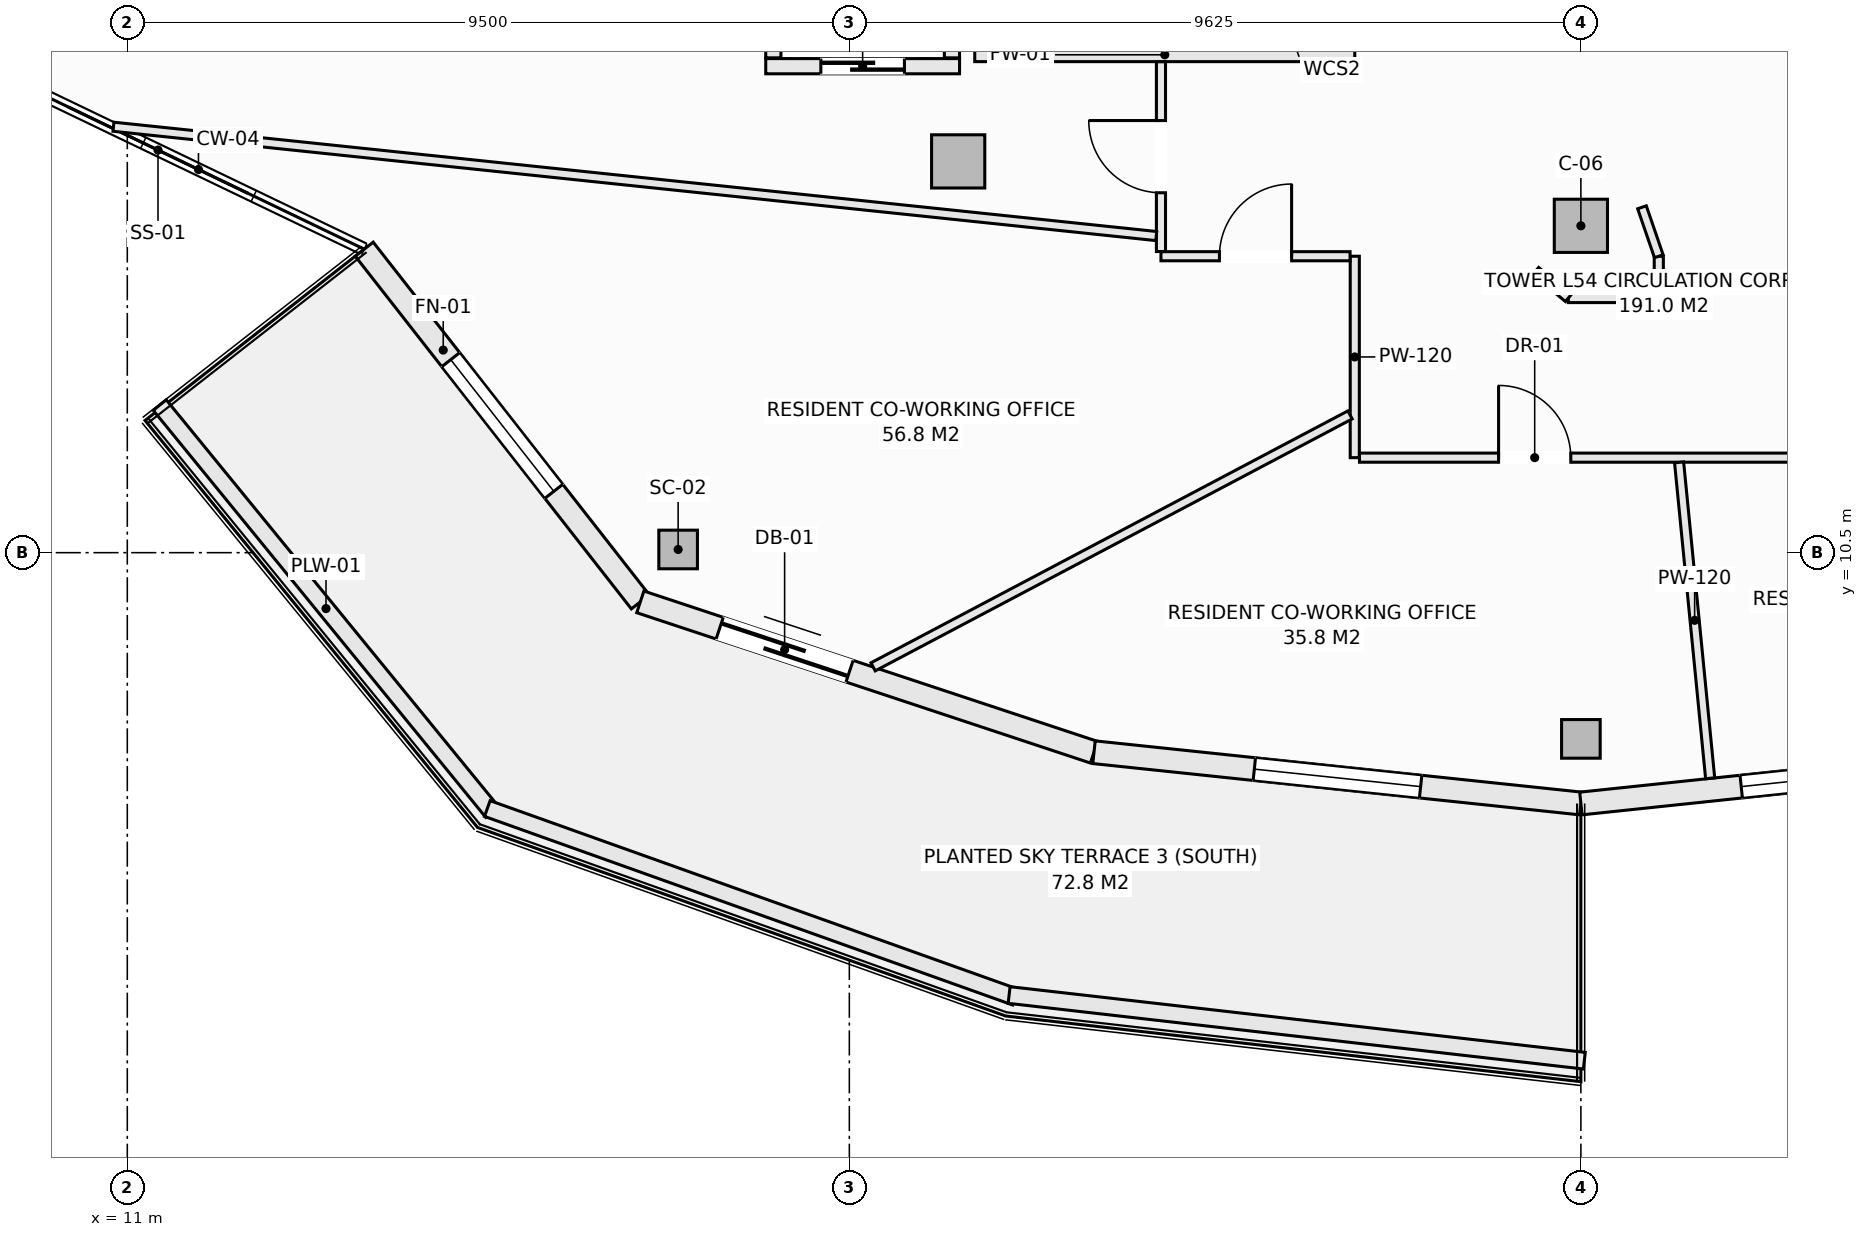
"""IFC4 building model, lengths in metres.
Left out: names, types, materials, properties, quantities, classifications, styles, units other than length and angle.
Written with IfcOpenShell. Run it as: python <this file> out.ifc"""

import sys

from ifc_helpers import new_model, si_unit, direction, frame, frame_2d, origin, origin_2d, place, context, subcontext, project, spatial, rectangle, hollow_rectangle, extrude, element, fill, save


model = new_model("IFC4")
c1 = context("Model", 3, precision=1e-05, world=origin(), true_north=direction((0.0, 1.0)))
c2 = subcontext(c1, "Body", "Model", "MODEL_VIEW")
j1 = project(units=[si_unit("LENGTHUNIT", "METRE"), si_unit("PLANEANGLEUNIT", "RADIAN")], contexts=[c1])
p1 = place(None, origin())
s1 = spatial("IfcSite", under=j1, at=p1, CompositionType="ELEMENT")
p2 = place(p1, origin())
s2 = spatial("IfcBuilding", under=s1, at=p2, CompositionType="ELEMENT")
p3 = place(p2, frame((0.0, 0.0, 206.3)))
s3 = spatial("IfcBuildingStorey", under=s2, at=p3, CompositionType="ELEMENT", Elevation=206.3)
for number, where, z_axis, x_axis in (
    (1, (18.247, 10.542, -0.27), (0.0, 0.0, 1.0), (1.0, 0.0, 0.0)),
    (2, (30.125, 8.05, -0.27), (0.0, 0.0, 1.0), (1.0, 0.0, 0.0)),
):
    element("IfcColumn", number, at=place(p3, frame(where, z_axis=z_axis, x_axis=x_axis)), inside=s3, PredefinedType="COLUMN", context=c2, shape_type="SweptSolid", body=[
        extrude(hollow_rectangle(XDim=0.508, YDim=0.508, WallThickness=0.019, at=origin_2d()), origin(), (0.0, 0.0, 1.0), 3.3),
    ])
for number, where, z_axis, x_axis in (
    (3, (21.932, 15.648, -0.27), (0.0, 0.0, 1.0), (1.0, 0.0, 0.0)),
    (4, (30.125, 14.8, -0.27), (0.0, 0.0, 1.0), (1.0, 0.0, 0.0)),
):
    element("IfcColumn", number, at=place(p3, frame(where, z_axis=z_axis, x_axis=x_axis)), inside=s3, PredefinedType="COLUMN", context=c2, shape_type="SweptSolid", body=[
        extrude(rectangle(XDim=0.7, YDim=0.7, at=origin_2d()), origin(), (0.0, 0.0, 1.0), 3.3),
    ])
p4 = place(p3, frame((14.117, 14.493, 0.0), z_axis=(0.0, 0.0, 1.0), x_axis=(0.616450126935, -0.787393955401, 0.0)))
e5 = element("IfcWall", 5, at=p4, inside=s3, PredefinedType="SOLIDWALL", context=c2, shape_type="SweptSolid", body=[
    extrude(rectangle(XDim=5.893, YDim=0.3, at=frame_2d((2.946, 0.0))), origin(), (0.0, 0.0, 1.0), 2.605),
])
p5 = place(p4, frame((1.846, 0.0, 0.72)))
e6 = element("IfcOpeningElement", 6, at=p5, cuts=e5, PredefinedType="OPENING", context=c2, shape_type="SweptSolid", body=[
    extrude(rectangle(XDim=2.2, YDim=1.65, at=frame_2d((1.1, 0.825))), frame((0.0, 0.16, 0.0), z_axis=(0.0, -1.0, 0.0), x_axis=(1.0, 0.0, 0.0)), (0.0, 0.0, 1.0), 0.32),
])
p6 = place(p3, frame((17.75, 9.853, 0.0), z_axis=(0.0, 0.0, 1.0), x_axis=(0.949240877604, -0.314550085495, 0.0)))
e7 = element("IfcWall", 7, at=p6, inside=s3, PredefinedType="SOLIDWALL", context=c2, shape_type="SweptSolid", body=[
    extrude(rectangle(XDim=6.288, YDim=0.3, at=frame_2d((3.144, 0.0))), origin(), (0.0, 0.0, 1.0), 2.605),
])
p7 = place(p6, frame((1.1, 0.0, 0.0)))
e8 = element("IfcOpeningElement", 8, at=p7, cuts=e7, PredefinedType="OPENING", context=c2, shape_type="SweptSolid", body=[
    extrude(rectangle(XDim=1.8, YDim=2.25, at=frame_2d((0.9, 1.125))), frame((0.0, 0.16, 0.0), z_axis=(0.0, -1.0, 0.0), x_axis=(1.0, 0.0, 0.0)), (0.0, 0.0, 1.0), 0.32),
])
p8 = place(p3, frame((23.719, 7.875, 0.0), z_axis=(0.0, 0.0, 1.0), x_axis=(0.994497142298, -0.104763705363, 0.0)))
e9 = element("IfcWall", 9, at=p8, inside=s3, PredefinedType="SOLIDWALL", context=c2, shape_type="SweptSolid", body=[
    extrude(rectangle(XDim=6.441, YDim=0.3, at=frame_2d((3.221, 0.0))), origin(), (0.0, 0.0, 1.0), 2.605),
])
p9 = place(p8, frame((2.121, 0.0, 0.72)))
e10 = element("IfcOpeningElement", 10, at=p9, cuts=e9, PredefinedType="OPENING", context=c2, shape_type="SweptSolid", body=[
    extrude(rectangle(XDim=2.2, YDim=1.65, at=frame_2d((1.1, 0.825))), frame((0.0, 0.16, 0.0), z_axis=(0.0, -1.0, 0.0), x_axis=(1.0, 0.0, 0.0)), (0.0, 0.0, 1.0), 0.32),
])
p10 = place(p3, frame((30.125, 7.2, 0.0), z_axis=(0.0, 0.0, 1.0), x_axis=(0.994497142298, 0.104763705363, 0.0)))
e11 = element("IfcWall", 11, at=p10, inside=s3, PredefinedType="SOLIDWALL", context=c2, shape_type="SweptSolid", body=[
    extrude(rectangle(XDim=6.441, YDim=0.3, at=frame_2d((3.221, 0.0))), origin(), (0.0, 0.0, 1.0), 2.605),
])
p11 = place(p10, frame((2.121, 0.0, 0.72)))
e12 = element("IfcOpeningElement", 12, at=p11, cuts=e11, PredefinedType="OPENING", context=c2, shape_type="SweptSolid", body=[
    extrude(rectangle(XDim=2.2, YDim=1.65, at=frame_2d((1.1, 0.825))), frame((0.0, 0.16, 0.0), z_axis=(0.0, -1.0, 0.0), x_axis=(1.0, 0.0, 0.0)), (0.0, 0.0, 1.0), 0.32),
])
p12 = place(p3, frame((11.427, 12.441, 0.0), z_axis=(0.0, 0.0, 1.0), x_axis=(0.632697312147, -0.774399193699, 0.0)))
e13 = element("IfcWall", 13, at=p12, inside=s3, PredefinedType="PARAPET", context=c2, shape_type="SweptSolid", body=[
    extrude(rectangle(XDim=6.914, YDim=0.22, at=frame_2d((3.457, 0.0))), origin(), (0.0, 0.0, 1.0), 0.52),
])
p13 = place(p3, frame((15.737, 7.134, 0.0), z_axis=(0.0, 0.0, 1.0), x_axis=(0.941780086523, -0.336229488042, 0.0)))
e14 = element("IfcWall", 14, at=p13, inside=s3, PredefinedType="PARAPET", context=c2, shape_type="SweptSolid", body=[
    extrude(rectangle(XDim=7.378, YDim=0.22, at=frame_2d((3.689, 0.0))), origin(), (0.0, 0.0, 1.0), 0.52),
])
p14 = place(p3, frame((22.602, 4.68, 0.0), z_axis=(0.0, 0.0, 1.0), x_axis=(0.993546198781, -0.113428175021, 0.0)))
e15 = element("IfcWall", 15, at=p14, inside=s3, PredefinedType="PARAPET", context=c2, shape_type="SweptSolid", body=[
    extrude(rectangle(XDim=7.617, YDim=0.22, at=frame_2d((3.809, 0.0))), origin(), (0.0, 0.0, 1.0), 0.52),
])
p15 = place(p3, frame((19.4, 16.9, 0.0), z_axis=(0.0, 0.0, 1.0), x_axis=(1.0, 0.0, 0.0)))
e16 = element("IfcWall", 16, at=p15, inside=s3, PredefinedType="SOLIDWALL", context=c2, shape_type="SweptSolid", body=[
    extrude(rectangle(XDim=2.55, YDim=0.2, at=frame_2d((1.275, 0.0))), origin(), (0.0, 0.0, 1.0), 3.03),
])
p16 = place(p15, frame((0.725, 0.0, 0.0)))
e17 = element("IfcOpeningElement", 17, at=p16, cuts=e16, PredefinedType="OPENING", context=c2, shape_type="SweptSolid", body=[
    extrude(rectangle(XDim=1.1, YDim=2.2, at=frame_2d((0.55, 1.1))), frame((0.0, 0.11, 0.0), z_axis=(0.0, -1.0, 0.0), x_axis=(1.0, 0.0, 0.0)), (0.0, 0.0, 1.0), 0.22),
])
for number, where, z_axis, x_axis in (
    (18, (19.5, 17.01, 0.0), (0.0, 0.0, 1.0), (0.0, 1.0, 0.0)),
    (19, (21.85, 17.01, 0.0), (0.0, 0.0, 1.0), (0.0, 1.0, 0.0)),
):
    element("IfcWall", number, at=place(p3, frame(where, z_axis=z_axis, x_axis=x_axis)), inside=s3, PredefinedType="SOLIDWALL", context=c2, shape_type="SweptSolid", body=[
        extrude(rectangle(XDim=2.53, YDim=0.2, at=frame_2d((1.265, 0.0))), origin(), (0.0, 0.0, 1.0), 3.03),
    ])
p17 = place(p3, frame((22.15, 17.05, 0.0), z_axis=(0.0, 0.0, 1.0), x_axis=(1.0, 0.0, 0.0)))
e20 = element("IfcWall", 20, at=p17, inside=s3, PredefinedType="SOLIDWALL", context=c2, shape_type="SweptSolid", body=[
    extrude(rectangle(XDim=5.0, YDim=0.18, at=frame_2d((2.5, 0.0))), origin(), (0.0, 0.0, 1.0), 3.03),
])
p18 = place(p3, frame((27.15, 11.75, 0.0), z_axis=(0.0, 0.0, 1.0), x_axis=(0.0, 1.0, 0.0)))
e21 = element("IfcWall", 21, at=p18, inside=s3, PredefinedType="PARTITIONING", context=c2, shape_type="SweptSolid", body=[
    extrude(rectangle(XDim=2.65, YDim=0.12, at=frame_2d((1.325, 0.0))), origin(), (0.0, 0.0, 1.0), 3.03),
])
p19 = place(p3, frame((24.6, 14.4, 0.0), z_axis=(0.0, 0.0, 1.0), x_axis=(1.0, 0.0, 0.0)))
e22 = element("IfcWall", 22, at=p19, inside=s3, PredefinedType="PARTITIONING", context=c2, shape_type="SweptSolid", body=[
    extrude(rectangle(XDim=2.488, YDim=0.12, at=frame_2d((1.244, 0.0))), origin(), (0.0, 0.0, 1.0), 3.03),
])
p20 = place(p19, frame((0.769, 0.0, 0.0)))
e23 = element("IfcOpeningElement", 23, at=p20, cuts=e22, PredefinedType="OPENING", context=c2, shape_type="SweptSolid", body=[
    extrude(rectangle(XDim=0.95, YDim=2.1, at=frame_2d((0.475, 1.05))), frame((0.0, 0.07, 0.0), z_axis=(0.0, -1.0, 0.0), x_axis=(1.0, 0.0, 0.0)), (0.0, 0.0, 1.0), 0.14),
])
p21 = place(p3, frame((27.212, 11.75, 0.0), z_axis=(0.0, 0.0, 1.0), x_axis=(1.0, 0.0, 0.0)))
e24 = element("IfcWall", 24, at=p21, inside=s3, PredefinedType="PARTITIONING", context=c2, shape_type="SweptSolid", body=[
    extrude(rectangle(XDim=8.676, YDim=0.12, at=frame_2d((4.338, 0.0))), origin(), (0.0, 0.0, 1.0), 3.03),
])
p22 = place(p21, frame((1.83, 0.0, 0.0)))
e25 = element("IfcOpeningElement", 25, at=p22, cuts=e24, PredefinedType="OPENING", context=c2, shape_type="SweptSolid", body=[
    extrude(rectangle(XDim=0.95, YDim=2.1, at=frame_2d((0.475, 1.05))), frame((0.0, 0.07, 0.0), z_axis=(0.0, -1.0, 0.0), x_axis=(1.0, 0.0, 0.0)), (0.0, 0.0, 1.0), 0.14),
])
p23 = place(p21, frame((5.757, 0.0, 0.0)))
e26 = element("IfcOpeningElement", 26, at=p23, cuts=e24, PredefinedType="OPENING", context=c2, shape_type="SweptSolid", body=[
    extrude(rectangle(XDim=0.95, YDim=2.1, at=frame_2d((0.475, 1.05))), frame((0.0, 0.07, 0.0), z_axis=(0.0, -1.0, 0.0), x_axis=(1.0, 0.0, 0.0)), (0.0, 0.0, 1.0), 0.14),
])
p24 = place(p3, frame((24.6, 14.462, 0.0), z_axis=(0.0, 0.0, 1.0), x_axis=(0.0, 1.0, 0.0)))
e27 = element("IfcWall", 27, at=p24, inside=s3, PredefinedType="PARTITIONING", context=c2, shape_type="SweptSolid", body=[
    extrude(rectangle(XDim=2.496, YDim=0.12, at=frame_2d((1.248, 0.0))), origin(), (0.0, 0.0, 1.0), 3.03),
])
p25 = place(p24, frame((0.773, 0.0, 0.0)))
e28 = element("IfcOpeningElement", 28, at=p25, cuts=e27, PredefinedType="OPENING", context=c2, shape_type="SweptSolid", body=[
    extrude(rectangle(XDim=0.95, YDim=2.1, at=frame_2d((0.475, 1.05))), frame((0.0, 0.07, 0.0), z_axis=(0.0, -1.0, 0.0), x_axis=(1.0, 0.0, 0.0)), (0.0, 0.0, 1.0), 0.14),
])
p26 = place(p3, frame((29.96, 13.85, 0.0), z_axis=(0.0, 0.0, 1.0), x_axis=(1.0, 0.0, 0.0)))
e29 = element("IfcWall", 29, at=p26, inside=s3, PredefinedType="PARTITIONING", context=c2, shape_type="SweptSolid", body=[
    extrude(rectangle(XDim=1.19, YDim=0.12, at=frame_2d((0.595, 0.0))), origin(), (0.0, 0.0, 1.0), 3.03),
])
p27 = place(p3, frame((31.15, 13.912, 0.0), z_axis=(0.0, 0.0, 1.0), x_axis=(0.0, 1.0, 0.0)))
e30 = element("IfcWall", 30, at=p27, inside=s3, PredefinedType="PARTITIONING", context=c2, shape_type="SweptSolid", body=[
    extrude(rectangle(XDim=0.488, YDim=0.12, at=frame_2d((0.244, 0.0))), origin(), (0.0, 0.0, 1.0), 3.03),
])
p28 = place(p3, frame((30.929, 15.044, 0.0), z_axis=(0.0, 0.0, 1.0), x_axis=(0.324498492416, -0.945886213252, 0.0)))
e31 = element("IfcWall", 31, at=p28, inside=s3, PredefinedType="PARTITIONING", context=c2, shape_type="SweptSolid", body=[
    extrude(rectangle(XDim=0.681, YDim=0.12, at=frame_2d((0.34, 0.0))), origin(), (0.0, 0.0, 1.0), 3.03),
])
p29 = place(p3, frame((29.531, 14.206, 0.0), z_axis=(0.0, 0.0, 1.0), x_axis=(0.7695479554, -0.638589026166, 0.0)))
e32 = element("IfcWall", 32, at=p29, inside=s3, PredefinedType="PARTITIONING", context=c2, shape_type="SweptSolid", body=[
    extrude(rectangle(XDim=0.557, YDim=0.12, at=frame_2d((0.279, 0.0))), origin(), (0.0, 0.0, 1.0), 3.03),
])
p30 = place(p3, frame((10.818, 16.104, 0.0), z_axis=(0.0, 0.0, 1.0), x_axis=(0.994552287984, -0.104238891333, 0.0)))
e33 = element("IfcWall", 33, at=p30, inside=s3, PredefinedType="PARTITIONING", context=c2, shape_type="SweptSolid", body=[
    extrude(rectangle(XDim=13.795, YDim=0.12, at=frame_2d((6.897, 0.0))), origin(), (0.0, 0.0, 1.0), 2.605),
])
p31 = place(p3, frame((20.813, 8.998, 0.0), z_axis=(0.0, 0.0, 1.0), x_axis=(0.884227698582, 0.467056074856, 0.0)))
e34 = element("IfcWall", 34, at=p31, inside=s3, PredefinedType="PARTITIONING", context=c2, shape_type="SweptSolid", body=[
    extrude(rectangle(XDim=7.096, YDim=0.12, at=frame_2d((3.548, 0.0))), origin(), (0.0, 0.0, 1.0), 3.03),
])
p32 = place(p3, frame((31.417, 11.688, 0.0), z_axis=(0.0, 0.0, 1.0), x_axis=(0.097923390467, -0.995193955769, 0.0)))
e35 = element("IfcWall", 35, at=p32, inside=s3, PredefinedType="PARTITIONING", context=c2, shape_type="SweptSolid", body=[
    extrude(rectangle(XDim=4.176, YDim=0.12, at=frame_2d((2.088, 0.0))), origin(), (0.0, 0.0, 1.0), 3.03),
])
p33 = place(p5, origin())
e36 = element("IfcWindow", 36, at=p33, inside=s3, PartitioningType="SINGLE_PANEL", PredefinedType="WINDOW", context=c2, shape_type="SweptSolid", body=[
    extrude(rectangle(XDim=2.2, YDim=1.65, at=frame_2d((1.1, 0.825))), frame((0.0, 0.03, 0.0), z_axis=(0.0, -1.0, 0.0), x_axis=(1.0, 0.0, 0.0)), (0.0, 0.0, 1.0), 0.06),
])
fill(e6, e36)
p34 = place(p7, frame((1.8, 0.0, 0.0), z_axis=(0.0, 0.0, 1.0), x_axis=(-1.0, 0.0, 0.0)))
e37 = element("IfcDoor", 37, at=p34, inside=s3, OperationType="SLIDING_TO_LEFT", PredefinedType="DOOR", context=c2, shape_type="SweptSolid", body=[
    extrude(rectangle(XDim=1.8, YDim=2.25, at=frame_2d((0.9, 1.125))), frame((0.0, 0.025, 0.0), z_axis=(0.0, -1.0, 0.0), x_axis=(1.0, 0.0, 0.0)), (0.0, 0.0, 1.0), 0.05),
])
fill(e8, e37)
p35 = place(p9, origin())
e38 = element("IfcWindow", 38, at=p35, inside=s3, PartitioningType="SINGLE_PANEL", PredefinedType="WINDOW", context=c2, shape_type="SweptSolid", body=[
    extrude(rectangle(XDim=2.2, YDim=1.65, at=frame_2d((1.1, 0.825))), frame((0.0, 0.03, 0.0), z_axis=(0.0, -1.0, 0.0), x_axis=(1.0, 0.0, 0.0)), (0.0, 0.0, 1.0), 0.06),
])
fill(e10, e38)
p36 = place(p11, origin())
e39 = element("IfcWindow", 39, at=p36, inside=s3, PartitioningType="SINGLE_PANEL", PredefinedType="WINDOW", context=c2, shape_type="SweptSolid", body=[
    extrude(rectangle(XDim=2.2, YDim=1.65, at=frame_2d((1.1, 0.825))), frame((0.0, 0.03, 0.0), z_axis=(0.0, -1.0, 0.0), x_axis=(1.0, 0.0, 0.0)), (0.0, 0.0, 1.0), 0.06),
])
fill(e12, e39)
p37 = place(p16, origin())
e40 = element("IfcDoor", 40, at=p37, inside=s3, OperationType="SLIDING_TO_LEFT", PredefinedType="DOOR", context=c2, shape_type="SweptSolid", body=[
    extrude(rectangle(XDim=1.1, YDim=2.2, at=frame_2d((0.55, 1.1))), frame((0.0, 0.025, 0.0), z_axis=(0.0, -1.0, 0.0), x_axis=(1.0, 0.0, 0.0)), (0.0, 0.0, 1.0), 0.05),
])
fill(e17, e40)
p38 = place(p20, origin())
e41 = element("IfcDoor", 41, at=p38, inside=s3, OperationType="SINGLE_SWING_RIGHT", PredefinedType="DOOR", context=c2, shape_type="SweptSolid", body=[
    extrude(rectangle(XDim=0.95, YDim=2.1, at=frame_2d((0.475, 1.05))), frame((0.0, 0.025, 0.0), z_axis=(0.0, -1.0, 0.0), x_axis=(1.0, 0.0, 0.0)), (0.0, 0.0, 1.0), 0.05),
])
fill(e23, e41)
p39 = place(p22, origin())
e42 = element("IfcDoor", 42, at=p39, inside=s3, OperationType="SINGLE_SWING_LEFT", PredefinedType="DOOR", context=c2, shape_type="SweptSolid", body=[
    extrude(rectangle(XDim=0.95, YDim=2.1, at=frame_2d((0.475, 1.05))), frame((0.0, 0.025, 0.0), z_axis=(0.0, -1.0, 0.0), x_axis=(1.0, 0.0, 0.0)), (0.0, 0.0, 1.0), 0.05),
])
fill(e25, e42)
p40 = place(p25, origin())
e43 = element("IfcDoor", 43, at=p40, inside=s3, OperationType="SINGLE_SWING_RIGHT", PredefinedType="DOOR", context=c2, shape_type="SweptSolid", body=[
    extrude(rectangle(XDim=0.95, YDim=2.1, at=frame_2d((0.475, 1.05))), frame((0.0, 0.025, 0.0), z_axis=(0.0, -1.0, 0.0), x_axis=(1.0, 0.0, 0.0)), (0.0, 0.0, 1.0), 0.05),
])
fill(e28, e43)
save(model, sys.argv[1])
